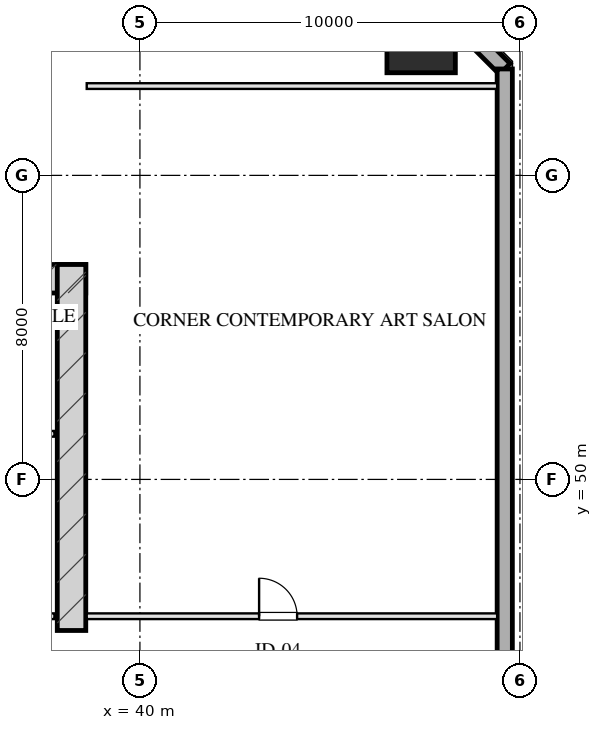
"""IFC4 building model, lengths in metres.
Left out: names, types, materials, properties, quantities, classifications, styles, units other than length and angle.
Written with IfcOpenShell. Run it as: python <this file> out.ifc"""

import sys

from ifc_helpers import new_model, si_unit, direction, frame, frame_2d, origin, origin_2d, place, context, subcontext, project, spatial, rectangle, hollow_rectangle, extrude, element, fill, save


model = new_model("IFC4")
c1 = context("Model", 3, precision=1e-05, world=origin(), true_north=direction((0.0, 1.0)))
c2 = subcontext(c1, "Body", "Model", "MODEL_VIEW")
j1 = project(units=[si_unit("LENGTHUNIT", "METRE"), si_unit("PLANEANGLEUNIT", "RADIAN")], contexts=[c1])
p1 = place(None, origin())
s1 = spatial("IfcSite", under=j1, at=p1, CompositionType="ELEMENT")
p2 = place(p1, origin())
s2 = spatial("IfcBuilding", under=s1, at=p2, CompositionType="ELEMENT")
p3 = place(p2, frame((0.0, 0.0, 57.5)))
s3 = spatial("IfcBuildingStorey", under=s2, at=p3, CompositionType="ELEMENT", Elevation=57.5)
p4 = place(p3, frame((21.425, 55.28, 0.0), z_axis=(0.0, 0.0, 1.0), x_axis=(1.0, 0.0, 0.0)))
e1 = element("IfcWall", 1, at=p4, inside=s3, PredefinedType="SHEAR", context=c2, shape_type="SweptSolid", body=[
    extrude(rectangle(XDim=17.15, YDim=0.75, at=frame_2d((8.575, 0.0))), origin(), (0.0, 0.0, 1.0), 3.45),
])
p5 = place(p3, frame((38.2, 46.025, 0.0), z_axis=(0.0, 0.0, 1.0), x_axis=(0.0, 1.0, 0.0)))
e2 = element("IfcWall", 2, at=p5, inside=s3, PredefinedType="SHEAR", context=c2, shape_type="SweptSolid", body=[
    extrude(rectangle(XDim=9.63, YDim=0.75, at=frame_2d((4.815, 0.0))), origin(), (0.0, 0.0, 1.0), 3.45),
])
p6 = place(p3, frame((47.4, 61.6, 0.0), z_axis=(0.0, 0.0, 1.0), x_axis=(1.0, 0.0, 0.0)))
e3 = element("IfcColumn", 3, at=p6, inside=s3, PredefinedType="COLUMN", context=c2, shape_type="SweptSolid", body=[
    extrude(hollow_rectangle(XDim=1.8, YDim=1.8, WallThickness=0.06, at=origin_2d()), origin(), (0.0, 0.0, 1.0), 3.451),
])
p7 = place(p3, frame((46.6, 63.8, 0.0), z_axis=(0.0, 0.0, 1.0), x_axis=(0.707106781187, -0.707106781187, 0.0)))
e4 = element("IfcWall", 4, at=p7, inside=s3, PredefinedType="SOLIDWALL", context=c2, shape_type="SweptSolid", body=[
    extrude(rectangle(XDim=4.243, YDim=0.4, at=frame_2d((2.121, 0.0))), origin(), (0.0, 0.0, 1.0), 2.61),
])
p8 = place(p3, frame((49.6, 60.8, 0.0), z_axis=(0.0, 0.0, 1.0), x_axis=(0.0, -1.0, 0.0)))
e5 = element("IfcWall", 5, at=p8, inside=s3, PredefinedType="SOLIDWALL", context=c2, shape_type="SweptSolid", body=[
    extrude(rectangle(XDim=53.6, YDim=0.4, at=frame_2d((26.8, 0.0))), origin(), (0.0, 0.0, 1.0), 2.61),
])
p9 = place(p8, frame((23.177, 0.0, 0.0)))
e6 = element("IfcOpeningElement", 6, at=p9, cuts=e5, PredefinedType="OPENING", context=c2, shape_type="SweptSolid", body=[
    extrude(rectangle(XDim=1.1, YDim=2.15, at=frame_2d((0.55, 1.075))), frame((0.0, 0.21, 0.0), z_axis=(0.0, -1.0, 0.0), x_axis=(1.0, 0.0, 0.0)), (0.0, 0.0, 1.0), 0.42),
])
p10 = place(p3, frame((33.95, 46.4, 0.0), z_axis=(0.0, 0.0, 1.0), x_axis=(1.0, 0.0, 0.0)))
e7 = element("IfcWall", 7, at=p10, inside=s3, PredefinedType="PARTITIONING", context=c2, shape_type="SweptSolid", body=[
    extrude(rectangle(XDim=3.8, YDim=0.15, at=frame_2d((1.9, 0.0))), origin(), (0.0, 0.0, 1.0), 3.175),
])
p11 = place(p10, frame((0.22, 0.0, 0.0)))
e8 = element("IfcOpeningElement", 8, at=p11, cuts=e7, PredefinedType="OPENING", context=c2, shape_type="SweptSolid", body=[
    extrude(rectangle(XDim=0.95, YDim=2.05, at=frame_2d((0.475, 1.025))), frame((0.0, 0.085, 0.0), z_axis=(0.0, -1.0, 0.0), x_axis=(1.0, 0.0, 0.0)), (0.0, 0.0, 1.0), 0.17),
])
p12 = place(p3, frame((35.45, 51.2, 0.0), z_axis=(0.0, 0.0, 1.0), x_axis=(1.0, 0.0, 0.0)))
e9 = element("IfcWall", 9, at=p12, inside=s3, PredefinedType="PARTITIONING", context=c2, shape_type="SweptSolid", body=[
    extrude(rectangle(XDim=2.3, YDim=0.15, at=frame_2d((1.15, 0.0))), origin(), (0.0, 0.0, 1.0), 3.175),
])
p13 = place(p3, frame((38.6, 60.35, 0.0), z_axis=(0.0, 0.0, 1.0), x_axis=(1.0, 0.0, 0.0)))
e10 = element("IfcWall", 10, at=p13, inside=s3, PredefinedType="PARTITIONING", context=c2, shape_type="SweptSolid", body=[
    extrude(rectangle(XDim=10.8, YDim=0.15, at=frame_2d((5.4, 0.0))), origin(), (0.0, 0.0, 1.0), 3.175),
])
p14 = place(p3, frame((38.6, 46.4, 0.0), z_axis=(0.0, 0.0, 1.0), x_axis=(1.0, 0.0, 0.0)))
e11 = element("IfcWall", 11, at=p14, inside=s3, PredefinedType="PARTITIONING", context=c2, shape_type="SweptSolid", body=[
    extrude(rectangle(XDim=10.8, YDim=0.15, at=frame_2d((5.4, 0.0))), origin(), (0.0, 0.0, 1.0), 3.175),
])
p15 = place(p14, frame((4.536, 0.0, 0.0)))
e12 = element("IfcOpeningElement", 12, at=p15, cuts=e11, PredefinedType="OPENING", context=c2, shape_type="SweptSolid", body=[
    extrude(rectangle(XDim=1.0, YDim=2.05, at=frame_2d((0.5, 1.025))), frame((0.0, 0.085, 0.0), z_axis=(0.0, -1.0, 0.0), x_axis=(1.0, 0.0, 0.0)), (0.0, 0.0, 1.0), 0.17),
])
p16 = place(p15, origin())
e13 = element("IfcDoor", 13, at=p16, inside=s3, OperationType="SINGLE_SWING_LEFT", PredefinedType="DOOR", context=c2, shape_type="SweptSolid", body=[
    extrude(rectangle(XDim=1.0, YDim=2.05, at=frame_2d((0.5, 1.025))), frame((0.0, 0.025, 0.0), z_axis=(0.0, -1.0, 0.0), x_axis=(1.0, 0.0, 0.0)), (0.0, 0.0, 1.0), 0.05),
])
fill(e12, e13)
save(model, sys.argv[1])
